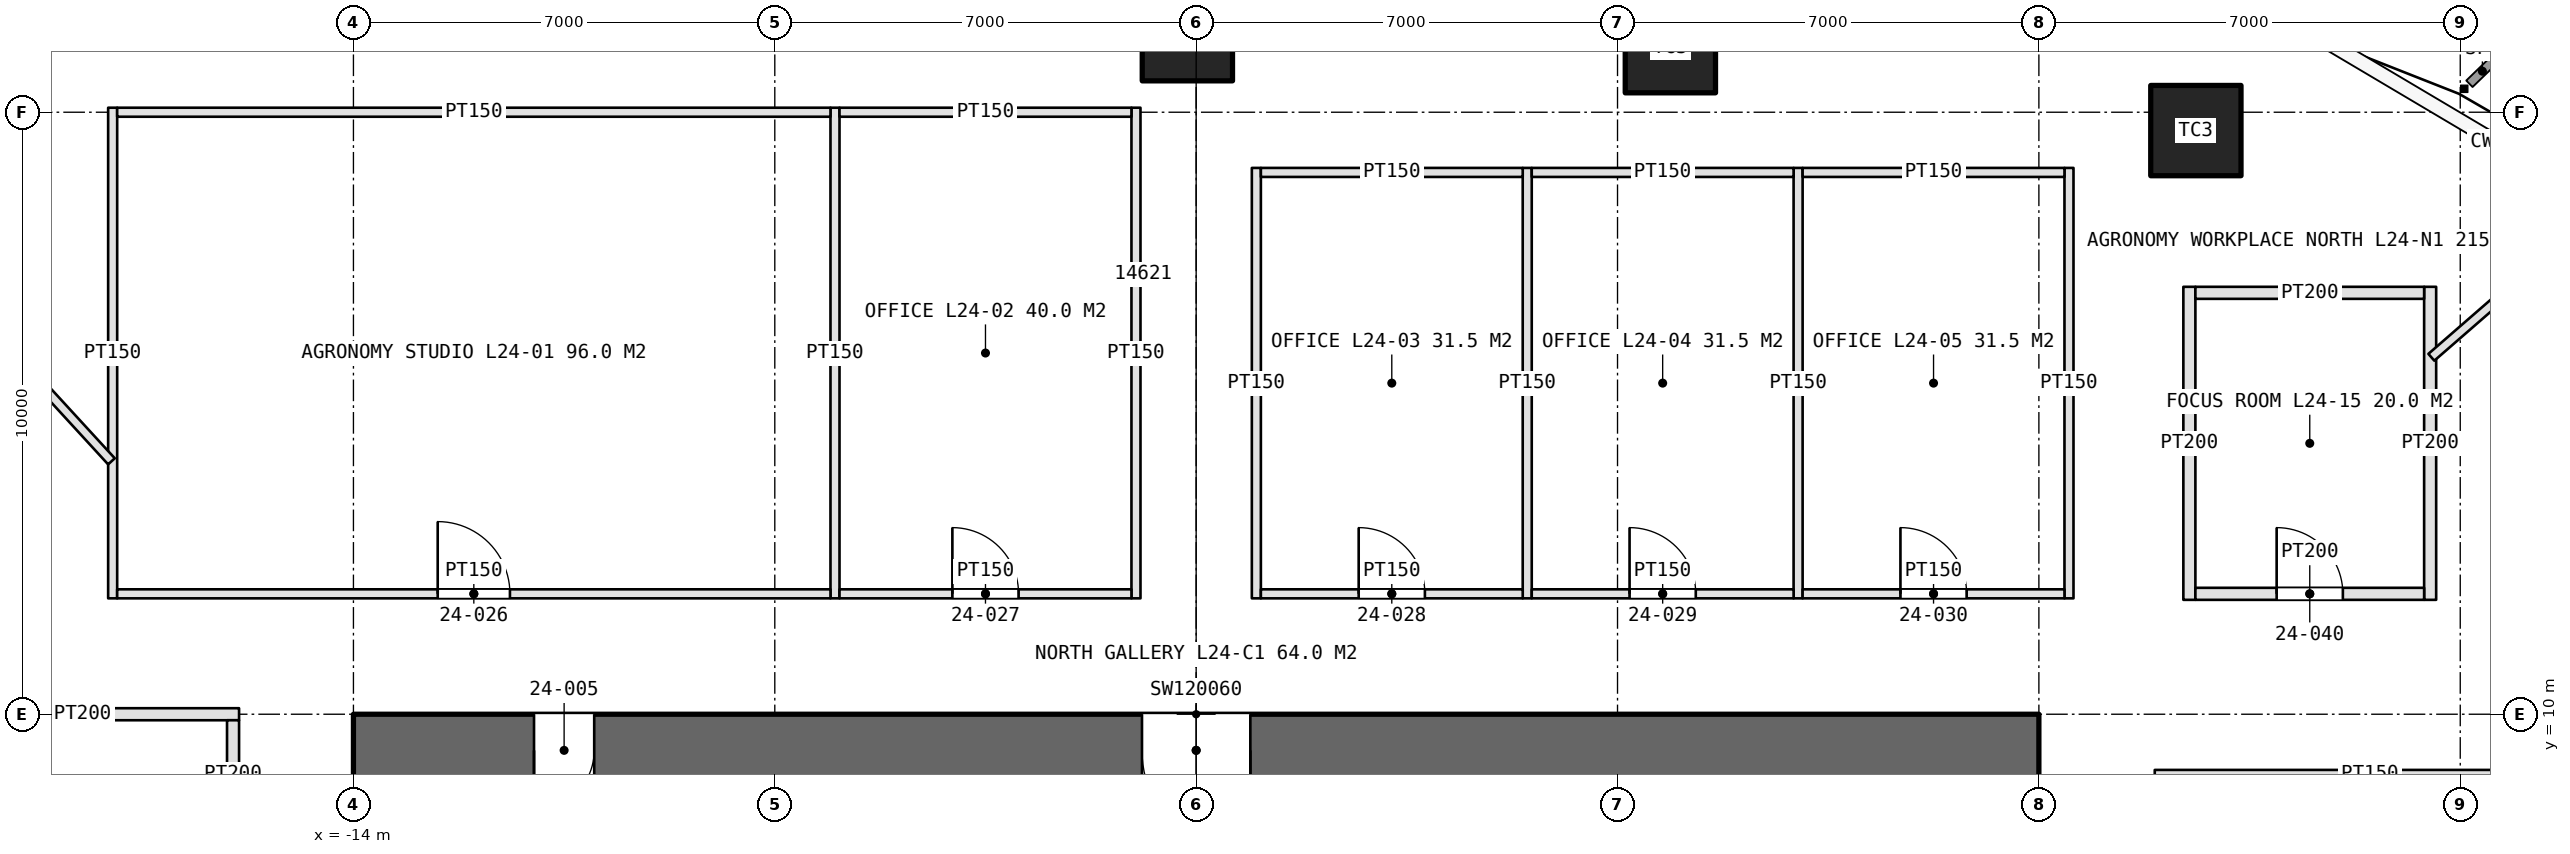
"""IFC4 building model, lengths in metres.
Left out: names, types, materials, properties, quantities, classifications, styles, units other than length and angle.
Written with IfcOpenShell. Run it as: python <this file> out.ifc"""

import sys

from ifc_helpers import new_model, si_unit, direction, frame, frame_2d, origin, origin_2d, place, context, subcontext, project, spatial, rectangle, extrude, element, fill, save


model = new_model("IFC4")
c1 = context("Model", 3, precision=1e-05, world=origin(), true_north=direction((0.0, 1.0)))
c2 = subcontext(c1, "Body", "Model", "MODEL_VIEW")
j1 = project(units=[si_unit("LENGTHUNIT", "METRE"), si_unit("PLANEANGLEUNIT", "RADIAN")], contexts=[c1])
p1 = place(None, origin())
s1 = spatial("IfcSite", under=j1, at=p1, CompositionType="ELEMENT")
p2 = place(p1, origin())
s2 = spatial("IfcBuilding", under=s1, at=p2, CompositionType="ELEMENT")
p3 = place(p2, frame((0.0, 0.0, 117.6)))
s3 = spatial("IfcBuildingStorey", under=s2, at=p3, CompositionType="ELEMENT", Elevation=117.6)
p4 = place(p3, frame((14.0, 9.4, 0.0), z_axis=(0.0, 0.0, 1.0), x_axis=(-1.0, 0.0, 0.0)))
e1 = element("IfcWall", 1, at=p4, inside=s3, PredefinedType="SHEAR", context=c2, shape_type="SweptSolid", body=[
    extrude(rectangle(XDim=28.0, YDim=1.2, at=frame_2d((14.0, 0.0))), origin(), (0.0, 0.0, 1.0), 4.2),
])
p5 = place(p4, frame((24.0, 0.0, 0.0)))
e2 = element("IfcOpeningElement", 2, at=p5, cuts=e1, PredefinedType="OPENING", context=c2, shape_type="SweptSolid", body=[
    extrude(rectangle(XDim=1.0, YDim=2.4, at=frame_2d((0.5, 1.2))), frame((0.0, 0.61, 0.0), z_axis=(0.0, -1.0, 0.0), x_axis=(1.0, 0.0, 0.0)), (0.0, 0.0, 1.0), 1.22),
])
p6 = place(p4, frame((13.1, 0.0, 0.0)))
e3 = element("IfcOpeningElement", 3, at=p6, cuts=e1, PredefinedType="OPENING", context=c2, shape_type="SweptSolid", body=[
    extrude(rectangle(XDim=1.8, YDim=2.4, at=frame_2d((0.9, 1.2))), frame((0.0, 0.61, 0.0), z_axis=(0.0, -1.0, 0.0), x_axis=(1.0, 0.0, 0.0)), (0.0, 0.0, 1.0), 1.22),
])
for number, where, z_axis, x_axis in (
    (4, (16.608, 19.695, 0.0), (0.0, 0.0, 1.0), (1.0, 0.0, 0.0)),
    (5, (7.878, 21.072, 0.0), (0.0, 0.0, 1.0), (1.0, 0.0, 0.0)),
    (6, (-0.146, 21.271, 0.0), (0.0, 0.0, 1.0), (1.0, 0.0, 0.0)),
):
    element("IfcColumn", number, at=place(p3, frame(where, z_axis=z_axis, x_axis=x_axis)), inside=s3, PredefinedType="COLUMN", context=c2, shape_type="SweptSolid", body=[
        extrude(rectangle(XDim=1.5, YDim=1.5, at=origin_2d()), origin(), (0.0, 0.0, 1.0), 4.2),
    ])
for number, where, z_axis, x_axis in (
    (7, (-18.0, 11.925, 0.0), (0.0, 0.0, 1.0), (0.0, 1.0, 0.0)),
    (8, (-6.0, 11.925, 0.0), (0.0, 0.0, 1.0), (0.0, 1.0, 0.0)),
    (9, (-1.0, 11.925, 0.0), (0.0, 0.0, 1.0), (0.0, 1.0, 0.0)),
):
    element("IfcWall", number, at=place(p3, frame(where, z_axis=z_axis, x_axis=x_axis)), inside=s3, PredefinedType="PARTITIONING", context=c2, shape_type="SweptSolid", body=[
        extrude(rectangle(XDim=8.15, YDim=0.15, at=frame_2d((4.075, 0.0))), origin(), (0.0, 0.0, 1.0), 3.0),
    ])
p7 = place(p3, frame((-17.925, 12.0, 0.0), z_axis=(0.0, 0.0, 1.0), x_axis=(1.0, 0.0, 0.0)))
e10 = element("IfcWall", 10, at=p7, inside=s3, PredefinedType="PARTITIONING", context=c2, shape_type="SweptSolid", body=[
    extrude(rectangle(XDim=11.85, YDim=0.15, at=frame_2d((5.925, 0.0))), origin(), (0.0, 0.0, 1.0), 3.0),
])
p8 = place(p7, frame((5.325, 0.0, 0.0)))
e11 = element("IfcOpeningElement", 11, at=p8, cuts=e10, PredefinedType="OPENING", context=c2, shape_type="SweptSolid", body=[
    extrude(rectangle(XDim=1.2, YDim=2.4, at=frame_2d((0.6, 1.2))), frame((0.0, 0.085, 0.0), z_axis=(0.0, -1.0, 0.0), x_axis=(1.0, 0.0, 0.0)), (0.0, 0.0, 1.0), 0.17),
])
p9 = place(p3, frame((-17.925, 20.0, 0.0), z_axis=(0.0, 0.0, 1.0), x_axis=(1.0, 0.0, 0.0)))
e12 = element("IfcWall", 12, at=p9, inside=s3, PredefinedType="PARTITIONING", context=c2, shape_type="SweptSolid", body=[
    extrude(rectangle(XDim=11.85, YDim=0.15, at=frame_2d((5.925, 0.0))), origin(), (0.0, 0.0, 1.0), 3.0),
])
p10 = place(p3, frame((-5.925, 12.0, 0.0), z_axis=(0.0, 0.0, 1.0), x_axis=(1.0, 0.0, 0.0)))
e13 = element("IfcWall", 13, at=p10, inside=s3, PredefinedType="PARTITIONING", context=c2, shape_type="SweptSolid", body=[
    extrude(rectangle(XDim=4.85, YDim=0.15, at=frame_2d((2.425, 0.0))), origin(), (0.0, 0.0, 1.0), 3.0),
])
p11 = place(p10, frame((1.875, 0.0, 0.0)))
e14 = element("IfcOpeningElement", 14, at=p11, cuts=e13, PredefinedType="OPENING", context=c2, shape_type="SweptSolid", body=[
    extrude(rectangle(XDim=1.1, YDim=2.3, at=frame_2d((0.55, 1.15))), frame((0.0, 0.085, 0.0), z_axis=(0.0, -1.0, 0.0), x_axis=(1.0, 0.0, 0.0)), (0.0, 0.0, 1.0), 0.17),
])
p12 = place(p3, frame((-5.925, 20.0, 0.0), z_axis=(0.0, 0.0, 1.0), x_axis=(1.0, 0.0, 0.0)))
e15 = element("IfcWall", 15, at=p12, inside=s3, PredefinedType="PARTITIONING", context=c2, shape_type="SweptSolid", body=[
    extrude(rectangle(XDim=4.85, YDim=0.15, at=frame_2d((2.425, 0.0))), origin(), (0.0, 0.0, 1.0), 3.0),
])
for number, where, z_axis, x_axis in (
    (16, (1.0, 11.925, 0.0), (0.0, 0.0, 1.0), (0.0, 1.0, 0.0)),
    (17, (5.5, 11.925, 0.0), (0.0, 0.0, 1.0), (0.0, 1.0, 0.0)),
    (18, (10.0, 11.925, 0.0), (0.0, 0.0, 1.0), (0.0, 1.0, 0.0)),
    (19, (14.5, 11.925, 0.0), (0.0, 0.0, 1.0), (0.0, 1.0, 0.0)),
):
    element("IfcWall", number, at=place(p3, frame(where, z_axis=z_axis, x_axis=x_axis)), inside=s3, PredefinedType="PARTITIONING", context=c2, shape_type="SweptSolid", body=[
        extrude(rectangle(XDim=7.15, YDim=0.15, at=frame_2d((3.575, 0.0))), origin(), (0.0, 0.0, 1.0), 3.0),
    ])
p13 = place(p3, frame((1.075, 12.0, 0.0), z_axis=(0.0, 0.0, 1.0), x_axis=(1.0, 0.0, 0.0)))
e20 = element("IfcWall", 20, at=p13, inside=s3, PredefinedType="PARTITIONING", context=c2, shape_type="SweptSolid", body=[
    extrude(rectangle(XDim=4.35, YDim=0.15, at=frame_2d((2.175, 0.0))), origin(), (0.0, 0.0, 1.0), 3.0),
])
p14 = place(p13, frame((1.625, 0.0, 0.0)))
e21 = element("IfcOpeningElement", 21, at=p14, cuts=e20, PredefinedType="OPENING", context=c2, shape_type="SweptSolid", body=[
    extrude(rectangle(XDim=1.1, YDim=2.3, at=frame_2d((0.55, 1.15))), frame((0.0, 0.085, 0.0), z_axis=(0.0, -1.0, 0.0), x_axis=(1.0, 0.0, 0.0)), (0.0, 0.0, 1.0), 0.17),
])
p15 = place(p3, frame((1.075, 19.0, 0.0), z_axis=(0.0, 0.0, 1.0), x_axis=(1.0, 0.0, 0.0)))
e22 = element("IfcWall", 22, at=p15, inside=s3, PredefinedType="PARTITIONING", context=c2, shape_type="SweptSolid", body=[
    extrude(rectangle(XDim=4.35, YDim=0.15, at=frame_2d((2.175, 0.0))), origin(), (0.0, 0.0, 1.0), 3.0),
])
p16 = place(p3, frame((5.575, 12.0, 0.0), z_axis=(0.0, 0.0, 1.0), x_axis=(1.0, 0.0, 0.0)))
e23 = element("IfcWall", 23, at=p16, inside=s3, PredefinedType="PARTITIONING", context=c2, shape_type="SweptSolid", body=[
    extrude(rectangle(XDim=4.35, YDim=0.15, at=frame_2d((2.175, 0.0))), origin(), (0.0, 0.0, 1.0), 3.0),
])
p17 = place(p16, frame((1.625, 0.0, 0.0)))
e24 = element("IfcOpeningElement", 24, at=p17, cuts=e23, PredefinedType="OPENING", context=c2, shape_type="SweptSolid", body=[
    extrude(rectangle(XDim=1.1, YDim=2.3, at=frame_2d((0.55, 1.15))), frame((0.0, 0.085, 0.0), z_axis=(0.0, -1.0, 0.0), x_axis=(1.0, 0.0, 0.0)), (0.0, 0.0, 1.0), 0.17),
])
p18 = place(p3, frame((5.575, 19.0, 0.0), z_axis=(0.0, 0.0, 1.0), x_axis=(1.0, 0.0, 0.0)))
e25 = element("IfcWall", 25, at=p18, inside=s3, PredefinedType="PARTITIONING", context=c2, shape_type="SweptSolid", body=[
    extrude(rectangle(XDim=4.35, YDim=0.15, at=frame_2d((2.175, 0.0))), origin(), (0.0, 0.0, 1.0), 3.0),
])
p19 = place(p3, frame((10.075, 12.0, 0.0), z_axis=(0.0, 0.0, 1.0), x_axis=(1.0, 0.0, 0.0)))
e26 = element("IfcWall", 26, at=p19, inside=s3, PredefinedType="PARTITIONING", context=c2, shape_type="SweptSolid", body=[
    extrude(rectangle(XDim=4.35, YDim=0.15, at=frame_2d((2.175, 0.0))), origin(), (0.0, 0.0, 1.0), 3.0),
])
p20 = place(p19, frame((1.625, 0.0, 0.0)))
e27 = element("IfcOpeningElement", 27, at=p20, cuts=e26, PredefinedType="OPENING", context=c2, shape_type="SweptSolid", body=[
    extrude(rectangle(XDim=1.1, YDim=2.3, at=frame_2d((0.55, 1.15))), frame((0.0, 0.085, 0.0), z_axis=(0.0, -1.0, 0.0), x_axis=(1.0, 0.0, 0.0)), (0.0, 0.0, 1.0), 0.17),
])
p21 = place(p3, frame((10.075, 19.0, 0.0), z_axis=(0.0, 0.0, 1.0), x_axis=(1.0, 0.0, 0.0)))
e28 = element("IfcWall", 28, at=p21, inside=s3, PredefinedType="PARTITIONING", context=c2, shape_type="SweptSolid", body=[
    extrude(rectangle(XDim=4.35, YDim=0.15, at=frame_2d((2.175, 0.0))), origin(), (0.0, 0.0, 1.0), 3.0),
])
p22 = place(p3, frame((15.925, 9.0, 0.0), z_axis=(0.0, 0.0, 1.0), x_axis=(1.0, 0.0, 0.0)))
e29 = element("IfcWall", 29, at=p22, inside=s3, PredefinedType="PARTITIONING", context=c2, shape_type="SweptSolid", body=[
    extrude(rectangle(XDim=7.15, YDim=0.15, at=frame_2d((3.575, 0.0))), origin(), (0.0, 0.0, 1.0), 3.0),
])
for number, where, z_axis, x_axis in (
    (30, (16.5, 11.9, 0.0), (0.0, 0.0, 1.0), (0.0, 1.0, 0.0)),
    (31, (20.5, 11.9, 0.0), (0.0, 0.0, 1.0), (0.0, 1.0, 0.0)),
):
    element("IfcWall", number, at=place(p3, frame(where, z_axis=z_axis, x_axis=x_axis)), inside=s3, PredefinedType="PARTITIONING", context=c2, shape_type="SweptSolid", body=[
        extrude(rectangle(XDim=5.2, YDim=0.2, at=frame_2d((2.6, 0.0))), origin(), (0.0, 0.0, 1.0), 3.0),
    ])
p23 = place(p3, frame((16.6, 12.0, 0.0), z_axis=(0.0, 0.0, 1.0), x_axis=(1.0, 0.0, 0.0)))
e32 = element("IfcWall", 32, at=p23, inside=s3, PredefinedType="PARTITIONING", context=c2, shape_type="SweptSolid", body=[
    extrude(rectangle(XDim=3.8, YDim=0.2, at=frame_2d((1.9, 0.0))), origin(), (0.0, 0.0, 1.0), 3.0),
])
p24 = place(p23, frame((1.35, 0.0, 0.0)))
e33 = element("IfcOpeningElement", 33, at=p24, cuts=e32, PredefinedType="OPENING", context=c2, shape_type="SweptSolid", body=[
    extrude(rectangle(XDim=1.1, YDim=2.3, at=frame_2d((0.55, 1.15))), frame((0.0, 0.11, 0.0), z_axis=(0.0, -1.0, 0.0), x_axis=(1.0, 0.0, 0.0)), (0.0, 0.0, 1.0), 0.22),
])
p25 = place(p3, frame((16.6, 17.0, 0.0), z_axis=(0.0, 0.0, 1.0), x_axis=(1.0, 0.0, 0.0)))
e34 = element("IfcWall", 34, at=p25, inside=s3, PredefinedType="PARTITIONING", context=c2, shape_type="SweptSolid", body=[
    extrude(rectangle(XDim=3.8, YDim=0.2, at=frame_2d((1.9, 0.0))), origin(), (0.0, 0.0, 1.0), 3.0),
])
p26 = place(p3, frame((-15.9, 10.0, 0.0), z_axis=(0.0, 0.0, 1.0), x_axis=(-1.0, 0.0, 0.0)))
e35 = element("IfcWall", 35, at=p26, inside=s3, PredefinedType="PARTITIONING", context=c2, shape_type="SweptSolid", body=[
    extrude(rectangle(XDim=5.2, YDim=0.2, at=frame_2d((2.6, 0.0))), origin(), (0.0, 0.0, 1.0), 3.0),
])
p27 = place(p3, frame((-16.0, 6.1, 0.0), z_axis=(0.0, 0.0, 1.0), x_axis=(0.0, 1.0, 0.0)))
e36 = element("IfcWall", 36, at=p27, inside=s3, PredefinedType="PARTITIONING", context=c2, shape_type="SweptSolid", body=[
    extrude(rectangle(XDim=3.8, YDim=0.2, at=frame_2d((1.9, 0.0))), origin(), (0.0, 0.0, 1.0), 3.0),
])
p28 = place(p27, frame((1.35, 0.0, 0.0)))
e37 = element("IfcOpeningElement", 37, at=p28, cuts=e36, PredefinedType="OPENING", context=c2, shape_type="SweptSolid", body=[
    extrude(rectangle(XDim=1.1, YDim=2.3, at=frame_2d((0.55, 1.15))), frame((0.0, 0.11, 0.0), z_axis=(0.0, -1.0, 0.0), x_axis=(1.0, 0.0, 0.0)), (0.0, 0.0, 1.0), 0.22),
])
p29 = place(p3, frame((-18.02, 14.201, 0.0), z_axis=(0.0, 0.0, 1.0), x_axis=(-0.676162058246, 0.736752923977, 0.0)))
e38 = element("IfcWall", 38, at=p29, inside=s3, PredefinedType="PARTITIONING", context=c2, shape_type="SweptSolid", body=[
    extrude(rectangle(XDim=7.934, YDim=0.15, at=frame_2d((3.967, 0.0))), origin(), (0.0, 0.0, 1.0), 3.0),
])
p30 = place(p3, frame((20.52, 15.929, 0.0), z_axis=(0.0, 0.0, 1.0), x_axis=(0.754686299234, 0.656085809745, 0.0)))
e39 = element("IfcWall", 39, at=p30, inside=s3, PredefinedType="PARTITIONING", context=c2, shape_type="SweptSolid", body=[
    extrude(rectangle(XDim=4.229, YDim=0.15, at=frame_2d((2.115, 0.0))), origin(), (0.0, 0.0, 1.0), 3.0),
])
p31 = place(p5, origin())
e40 = element("IfcDoor", 40, at=p31, inside=s3, OperationType="SINGLE_SWING_RIGHT", PredefinedType="DOOR", context=c2, shape_type="SweptSolid", body=[
    extrude(rectangle(XDim=1.0, YDim=2.4, at=frame_2d((0.5, 1.2))), frame((0.0, 0.025, 0.0), z_axis=(0.0, -1.0, 0.0), x_axis=(1.0, 0.0, 0.0)), (0.0, 0.0, 1.0), 0.05),
])
fill(e2, e40)
p32 = place(p6, origin())
e41 = element("IfcDoor", 41, at=p32, inside=s3, OperationType="DOUBLE_DOOR_SINGLE_SWING", PredefinedType="DOOR", context=c2, shape_type="SweptSolid", body=[
    extrude(rectangle(XDim=1.8, YDim=2.4, at=frame_2d((0.9, 1.2))), frame((0.0, 0.025, 0.0), z_axis=(0.0, -1.0, 0.0), x_axis=(1.0, 0.0, 0.0)), (0.0, 0.0, 1.0), 0.05),
])
fill(e3, e41)
p33 = place(p8, origin())
e42 = element("IfcDoor", 42, at=p33, inside=s3, OperationType="SINGLE_SWING_LEFT", PredefinedType="DOOR", context=c2, shape_type="SweptSolid", body=[
    extrude(rectangle(XDim=1.2, YDim=2.4, at=frame_2d((0.6, 1.2))), frame((0.0, 0.025, 0.0), z_axis=(0.0, -1.0, 0.0), x_axis=(1.0, 0.0, 0.0)), (0.0, 0.0, 1.0), 0.05),
])
fill(e11, e42)
p34 = place(p11, origin())
e43 = element("IfcDoor", 43, at=p34, inside=s3, OperationType="SINGLE_SWING_LEFT", PredefinedType="DOOR", context=c2, shape_type="SweptSolid", body=[
    extrude(rectangle(XDim=1.1, YDim=2.3, at=frame_2d((0.55, 1.15))), frame((0.0, 0.025, 0.0), z_axis=(0.0, -1.0, 0.0), x_axis=(1.0, 0.0, 0.0)), (0.0, 0.0, 1.0), 0.05),
])
fill(e14, e43)
p35 = place(p14, origin())
e44 = element("IfcDoor", 44, at=p35, inside=s3, OperationType="SINGLE_SWING_LEFT", PredefinedType="DOOR", context=c2, shape_type="SweptSolid", body=[
    extrude(rectangle(XDim=1.1, YDim=2.3, at=frame_2d((0.55, 1.15))), frame((0.0, 0.025, 0.0), z_axis=(0.0, -1.0, 0.0), x_axis=(1.0, 0.0, 0.0)), (0.0, 0.0, 1.0), 0.05),
])
fill(e21, e44)
p36 = place(p17, origin())
e45 = element("IfcDoor", 45, at=p36, inside=s3, OperationType="SINGLE_SWING_LEFT", PredefinedType="DOOR", context=c2, shape_type="SweptSolid", body=[
    extrude(rectangle(XDim=1.1, YDim=2.3, at=frame_2d((0.55, 1.15))), frame((0.0, 0.025, 0.0), z_axis=(0.0, -1.0, 0.0), x_axis=(1.0, 0.0, 0.0)), (0.0, 0.0, 1.0), 0.05),
])
fill(e24, e45)
p37 = place(p20, origin())
e46 = element("IfcDoor", 46, at=p37, inside=s3, OperationType="SINGLE_SWING_LEFT", PredefinedType="DOOR", context=c2, shape_type="SweptSolid", body=[
    extrude(rectangle(XDim=1.1, YDim=2.3, at=frame_2d((0.55, 1.15))), frame((0.0, 0.025, 0.0), z_axis=(0.0, -1.0, 0.0), x_axis=(1.0, 0.0, 0.0)), (0.0, 0.0, 1.0), 0.05),
])
fill(e27, e46)
p38 = place(p24, origin())
e47 = element("IfcDoor", 47, at=p38, inside=s3, OperationType="SINGLE_SWING_LEFT", PredefinedType="DOOR", context=c2, shape_type="SweptSolid", body=[
    extrude(rectangle(XDim=1.1, YDim=2.3, at=frame_2d((0.55, 1.15))), frame((0.0, 0.025, 0.0), z_axis=(0.0, -1.0, 0.0), x_axis=(1.0, 0.0, 0.0)), (0.0, 0.0, 1.0), 0.05),
])
fill(e33, e47)
save(model, sys.argv[1])
